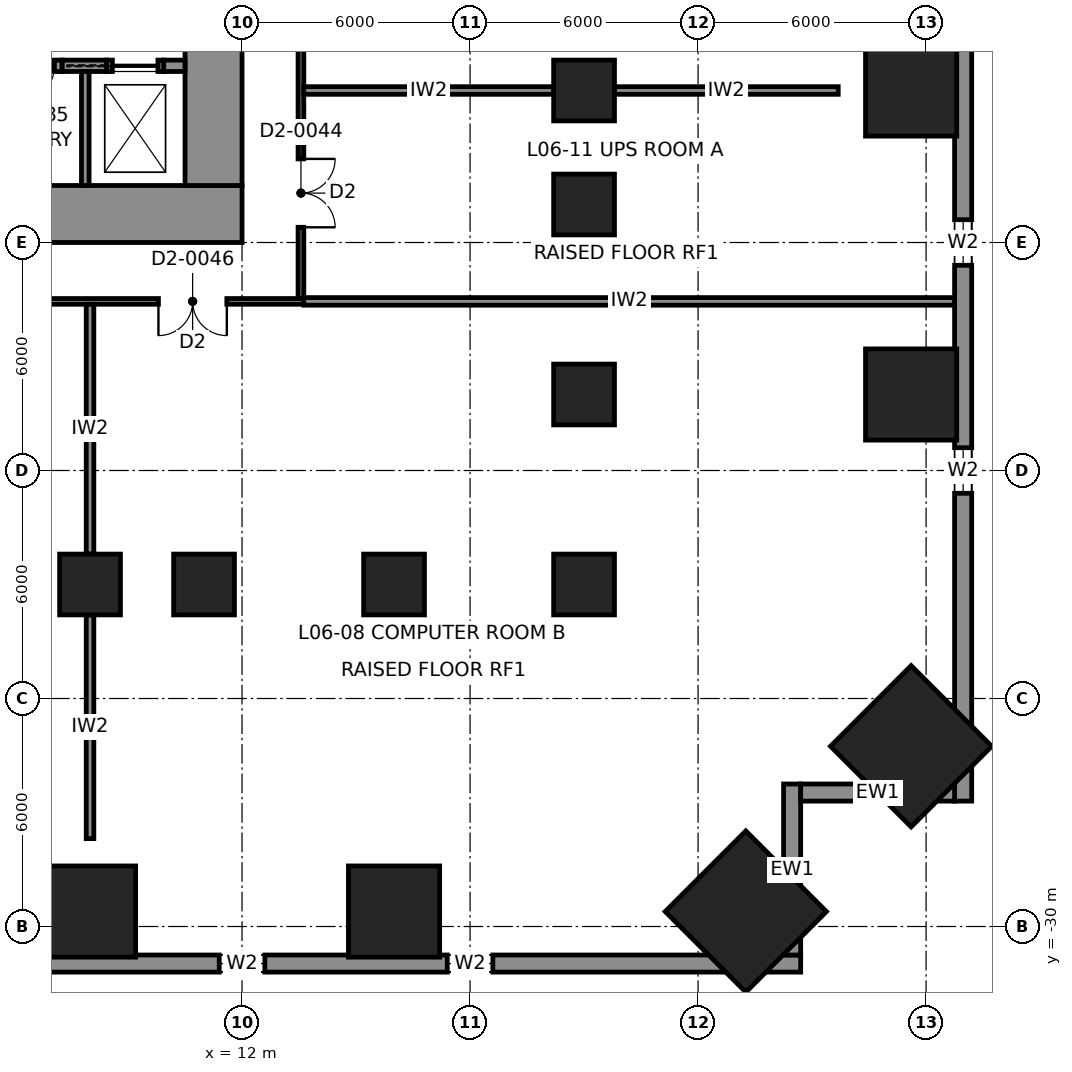
"""IFC4 building model, lengths in metres.
Left out: names, types, materials, properties, quantities, classifications, styles, units other than length and angle.
Written with IfcOpenShell. Run it as: python <this file> out.ifc"""

import sys

from ifc_helpers import new_model, si_unit, direction, frame, frame_2d, origin, origin_2d, place, context, subcontext, project, spatial, rectangle, extrude, element, fill, save


model = new_model("IFC4")
c1 = context("Model", 3, precision=1e-05, world=origin(), true_north=direction((0.0, 1.0)))
c2 = subcontext(c1, "Body", "Model", "MODEL_VIEW")
j1 = project(units=[si_unit("LENGTHUNIT", "METRE"), si_unit("PLANEANGLEUNIT", "RADIAN")], contexts=[c1])
p1 = place(None, origin())
s1 = spatial("IfcSite", under=j1, at=p1, CompositionType="ELEMENT")
p2 = place(p1, origin())
s2 = spatial("IfcBuilding", under=s1, at=p2, CompositionType="ELEMENT")
p3 = place(p2, frame((0.0, 0.0, 32.0)))
s3 = spatial("IfcBuildingStorey", under=s2, at=p3, CompositionType="ELEMENT", Elevation=32.0)
for number, where, z_axis, x_axis in (
    (1, (29.606, -25.256, 0.0), (-0.04, 0.04, 0.998), (-0.707, -0.707, 0.0)),
    (2, (25.256, -29.606, 0.0), (-0.04, 0.04, 0.998), (-0.707, -0.707, 0.0)),
):
    element("IfcColumn", number, at=place(p3, frame(where, z_axis=z_axis, x_axis=x_axis)), inside=s3, PredefinedType="COLUMN", context=c2, shape_type="SweptSolid", body=[
        extrude(rectangle(XDim=3.0, YDim=3.0, at=origin_2d()), origin(), (0.0, 0.0, 1.0), 5.509),
    ])
for number, where, z_axis, x_axis in (
    (3, (29.606, -8.0, 0.0), (-0.04, 0.0, 0.999), (0.0, -1.0, 0.0)),
    (4, (29.606, -16.0, 0.0), (-0.04, 0.0, 0.999), (0.0, -1.0, 0.0)),
    (5, (8.0, -29.606, 0.0), (0.0, 0.04, 0.999), (-1.0, 0.0, 0.0)),
    (6, (16.0, -29.606, 0.0), (0.0, 0.04, 0.999), (-1.0, 0.0, 0.0)),
):
    element("IfcColumn", number, at=place(p3, frame(where, z_axis=z_axis, x_axis=x_axis)), inside=s3, PredefinedType="COLUMN", context=c2, shape_type="SweptSolid", body=[
        extrude(rectangle(XDim=2.4, YDim=2.4, at=origin_2d()), origin(), (0.0, 0.0, 1.0), 5.504),
    ])
for number, where, z_axis, x_axis in (
    (7, (21.0, -8.0, 0.0), (0.0, 0.0, 1.0), (1.0, 0.0, 0.0)),
    (8, (21.0, -11.0, 0.0), (0.0, 0.0, 1.0), (1.0, 0.0, 0.0)),
    (9, (21.0, -16.0, 0.0), (0.0, 0.0, 1.0), (1.0, 0.0, 0.0)),
    (10, (8.0, -21.0, 0.0), (0.0, 0.0, 1.0), (1.0, 0.0, 0.0)),
    (11, (11.0, -21.0, 0.0), (0.0, 0.0, 1.0), (1.0, 0.0, 0.0)),
    (12, (16.0, -21.0, 0.0), (0.0, 0.0, 1.0), (1.0, 0.0, 0.0)),
    (13, (21.0, -21.0, 0.0), (0.0, 0.0, 1.0), (1.0, 0.0, 0.0)),
):
    element("IfcColumn", number, at=place(p3, frame(where, z_axis=z_axis, x_axis=x_axis)), inside=s3, PredefinedType="COLUMN", context=c2, shape_type="SweptSolid", body=[
        extrude(rectangle(XDim=1.6, YDim=1.6, at=origin_2d()), origin(), (0.0, 0.0, 1.0), 5.5),
    ])
p4 = place(p3, frame((12.0, -11.25, 0.0), z_axis=(0.0, 0.0, 1.0), x_axis=(-1.0, 0.0, 0.0)))
e14 = element("IfcWall", 14, at=p4, inside=s3, PredefinedType="SHEAR", context=c2, shape_type="SweptSolid", body=[
    extrude(rectangle(XDim=24.0, YDim=1.5, at=frame_2d((12.0, 0.0))), origin(), (0.0, 0.0, 1.0), 5.5),
])
p5 = place(p3, frame((11.25, 10.5, 0.0), z_axis=(0.0, 0.0, 1.0), x_axis=(0.0, -1.0, 0.0)))
e15 = element("IfcWall", 15, at=p5, inside=s3, PredefinedType="SHEAR", context=c2, shape_type="SweptSolid", body=[
    extrude(rectangle(XDim=21.0, YDim=1.5, at=frame_2d((10.5, 0.0))), origin(), (0.0, 0.0, 1.0), 5.5),
])
p6 = place(p5, frame((3.7, 0.0, 0.0)))
e16 = element("IfcOpeningElement", 16, at=p6, cuts=e15, PredefinedType="OPENING", context=c2, shape_type="SweptSolid", body=[
    extrude(rectangle(XDim=1.2, YDim=2.3, at=frame_2d((0.6, 1.15))), frame((0.0, 0.76, 0.0), z_axis=(0.0, -1.0, 0.0), x_axis=(1.0, 0.0, 0.0)), (0.0, 0.0, 1.0), 1.52),
])
p7 = place(p5, frame((16.1, 0.0, 0.0)))
e17 = element("IfcOpeningElement", 17, at=p7, cuts=e15, PredefinedType="OPENING", context=c2, shape_type="SweptSolid", body=[
    extrude(rectangle(XDim=1.2, YDim=2.3, at=frame_2d((0.6, 1.15))), frame((0.0, 0.76, 0.0), z_axis=(0.0, -1.0, 0.0), x_axis=(1.0, 0.0, 0.0)), (0.0, 0.0, 1.0), 1.52),
])
p8 = place(p3, frame((7.262, -7.35, 0.0), z_axis=(0.0, 0.0, 1.0), x_axis=(1.0, 0.0, 0.0)))
e18 = element("IfcWall", 18, at=p8, inside=s3, PredefinedType="SHEAR", context=c2, shape_type="SweptSolid", body=[
    extrude(rectangle(XDim=1.175, YDim=0.3, at=frame_2d((0.587, 0.0))), origin(), (0.0, 0.0, 1.0), 5.5),
])
p9 = place(p3, frame((9.938, -7.35, 0.0), z_axis=(0.0, 0.0, 1.0), x_axis=(1.0, 0.0, 0.0)))
e19 = element("IfcWall", 19, at=p9, inside=s3, PredefinedType="SHEAR", context=c2, shape_type="SweptSolid", body=[
    extrude(rectangle(XDim=0.562, YDim=0.3, at=frame_2d((0.281, 0.0))), origin(), (0.0, 0.0, 1.0), 5.5),
])
p10 = place(p3, frame((5.863, -7.35, 0.0), z_axis=(0.0, 0.0, 1.0), x_axis=(1.0, 0.0, 0.0)))
e20 = element("IfcWall", 20, at=p10, inside=s3, PredefinedType="PARTITIONING", context=c2, shape_type="SweptSolid", body=[
    extrude(rectangle(XDim=1.4, YDim=0.3, at=frame_2d((0.7, 0.0))), origin(), (0.0, 0.0, 1.0), 5.5),
])
p11 = place(p10, frame((0.2, 0.0, 0.0)))
e21 = element("IfcOpeningElement", 21, at=p11, cuts=e20, PredefinedType="OPENING", context=c2, shape_type="SweptSolid", body=[
    extrude(rectangle(XDim=1.0, YDim=2.3, at=frame_2d((0.5, 1.15))), frame((0.0, 0.16, 0.0), z_axis=(0.0, -1.0, 0.0), x_axis=(1.0, 0.0, 0.0)), (0.0, 0.0, 1.0), 0.32),
])
p12 = place(p3, frame((8.438, -7.35, 0.0), z_axis=(0.0, 0.0, 1.0), x_axis=(1.0, 0.0, 0.0)))
e22 = element("IfcWall", 22, at=p12, inside=s3, PredefinedType="PARTITIONING", context=c2, shape_type="SweptSolid", body=[
    extrude(rectangle(XDim=1.5, YDim=0.3, at=frame_2d((0.75, 0.0))), origin(), (0.0, 0.0, 1.0), 5.5),
])
p13 = place(p12, frame((0.15, 0.0, 0.0)))
e23 = element("IfcOpeningElement", 23, at=p13, cuts=e22, PredefinedType="OPENING", context=c2, shape_type="SweptSolid", body=[
    extrude(rectangle(XDim=1.2, YDim=2.3, at=frame_2d((0.6, 1.15))), frame((0.0, 0.16, 0.0), z_axis=(0.0, -1.0, 0.0), x_axis=(1.0, 0.0, 0.0)), (0.0, 0.0, 1.0), 0.32),
])
p14 = place(p3, frame((7.875, -10.5, 0.0), z_axis=(0.0, 0.0, 1.0), x_axis=(0.0, 1.0, 0.0)))
e24 = element("IfcWall", 24, at=p14, inside=s3, PredefinedType="PARTITIONING", context=c2, shape_type="SweptSolid", body=[
    extrude(rectangle(XDim=3.0, YDim=0.2, at=frame_2d((1.5, 0.0))), origin(), (0.0, 0.0, 1.0), 5.5),
])
p15 = place(p3, frame((30.975, -26.7, 0.0), z_axis=(0.0, 0.0, 1.0), x_axis=(0.0, 1.0, 0.0)))
e25 = element("IfcWall", 25, at=p15, inside=s3, PredefinedType="SOLIDWALL", context=c2, shape_type="SweptSolid", body=[
    extrude(rectangle(XDim=53.4, YDim=0.45, at=frame_2d((26.7, 0.0))), origin(), (0.0, 0.0, 1.0), 5.3),
])
p16 = place(p15, frame((8.1, 0.0, 0.9)))
e26 = element("IfcOpeningElement", 26, at=p16, cuts=e25, PredefinedType="OPENING", context=c2, shape_type="SweptSolid", body=[
    extrude(rectangle(XDim=1.2, YDim=2.0, at=frame_2d((0.6, 1.0))), frame((0.0, 0.235, 0.0), z_axis=(0.0, -1.0, 0.0), x_axis=(1.0, 0.0, 0.0)), (0.0, 0.0, 1.0), 0.47),
])
p17 = place(p15, frame((14.1, 0.0, 0.9)))
e27 = element("IfcOpeningElement", 27, at=p17, cuts=e25, PredefinedType="OPENING", context=c2, shape_type="SweptSolid", body=[
    extrude(rectangle(XDim=1.2, YDim=2.0, at=frame_2d((0.6, 1.0))), frame((0.0, 0.235, 0.0), z_axis=(0.0, -1.0, 0.0), x_axis=(1.0, 0.0, 0.0)), (0.0, 0.0, 1.0), 0.47),
])
p18 = place(p15, frame((20.1, 0.0, 0.9)))
e28 = element("IfcOpeningElement", 28, at=p18, cuts=e25, PredefinedType="OPENING", context=c2, shape_type="SweptSolid", body=[
    extrude(rectangle(XDim=1.2, YDim=2.0, at=frame_2d((0.6, 1.0))), frame((0.0, 0.235, 0.0), z_axis=(0.0, -1.0, 0.0), x_axis=(1.0, 0.0, 0.0)), (0.0, 0.0, 1.0), 0.47),
])
p19 = place(p15, frame((32.1, 0.0, 0.9)))
e29 = element("IfcOpeningElement", 29, at=p19, cuts=e25, PredefinedType="OPENING", context=c2, shape_type="SweptSolid", body=[
    extrude(rectangle(XDim=1.2, YDim=2.0, at=frame_2d((0.6, 1.0))), frame((0.0, 0.235, 0.0), z_axis=(0.0, -1.0, 0.0), x_axis=(1.0, 0.0, 0.0)), (0.0, 0.0, 1.0), 0.47),
])
p20 = place(p15, frame((38.1, 0.0, 0.9)))
e30 = element("IfcOpeningElement", 30, at=p20, cuts=e25, PredefinedType="OPENING", context=c2, shape_type="SweptSolid", body=[
    extrude(rectangle(XDim=1.2, YDim=2.0, at=frame_2d((0.6, 1.0))), frame((0.0, 0.235, 0.0), z_axis=(0.0, -1.0, 0.0), x_axis=(1.0, 0.0, 0.0)), (0.0, 0.0, 1.0), 0.47),
])
p21 = place(p15, frame((44.1, 0.0, 0.9)))
e31 = element("IfcOpeningElement", 31, at=p21, cuts=e25, PredefinedType="OPENING", context=c2, shape_type="SweptSolid", body=[
    extrude(rectangle(XDim=1.2, YDim=2.0, at=frame_2d((0.6, 1.0))), frame((0.0, 0.235, 0.0), z_axis=(0.0, -1.0, 0.0), x_axis=(1.0, 0.0, 0.0)), (0.0, 0.0, 1.0), 0.47),
])
p22 = place(p3, frame((-26.7, -30.975, 0.0), z_axis=(0.0, 0.0, 1.0), x_axis=(1.0, 0.0, 0.0)))
e32 = element("IfcWall", 32, at=p22, inside=s3, PredefinedType="SOLIDWALL", context=c2, shape_type="SweptSolid", body=[
    extrude(rectangle(XDim=53.4, YDim=0.45, at=frame_2d((26.7, 0.0))), origin(), (0.0, 0.0, 1.0), 5.3),
])
p23 = place(p22, frame((8.1, 0.0, 0.9)))
e33 = element("IfcOpeningElement", 33, at=p23, cuts=e32, PredefinedType="OPENING", context=c2, shape_type="SweptSolid", body=[
    extrude(rectangle(XDim=1.2, YDim=2.0, at=frame_2d((0.6, 1.0))), frame((0.0, 0.235, 0.0), z_axis=(0.0, -1.0, 0.0), x_axis=(1.0, 0.0, 0.0)), (0.0, 0.0, 1.0), 0.47),
])
p24 = place(p22, frame((14.1, 0.0, 0.9)))
e34 = element("IfcOpeningElement", 34, at=p24, cuts=e32, PredefinedType="OPENING", context=c2, shape_type="SweptSolid", body=[
    extrude(rectangle(XDim=1.2, YDim=2.0, at=frame_2d((0.6, 1.0))), frame((0.0, 0.235, 0.0), z_axis=(0.0, -1.0, 0.0), x_axis=(1.0, 0.0, 0.0)), (0.0, 0.0, 1.0), 0.47),
])
p25 = place(p22, frame((20.1, 0.0, 0.9)))
e35 = element("IfcOpeningElement", 35, at=p25, cuts=e32, PredefinedType="OPENING", context=c2, shape_type="SweptSolid", body=[
    extrude(rectangle(XDim=1.2, YDim=2.0, at=frame_2d((0.6, 1.0))), frame((0.0, 0.235, 0.0), z_axis=(0.0, -1.0, 0.0), x_axis=(1.0, 0.0, 0.0)), (0.0, 0.0, 1.0), 0.47),
])
p26 = place(p22, frame((32.1, 0.0, 0.9)))
e36 = element("IfcOpeningElement", 36, at=p26, cuts=e32, PredefinedType="OPENING", context=c2, shape_type="SweptSolid", body=[
    extrude(rectangle(XDim=1.2, YDim=2.0, at=frame_2d((0.6, 1.0))), frame((0.0, 0.235, 0.0), z_axis=(0.0, -1.0, 0.0), x_axis=(1.0, 0.0, 0.0)), (0.0, 0.0, 1.0), 0.47),
])
p27 = place(p22, frame((38.1, 0.0, 0.9)))
e37 = element("IfcOpeningElement", 37, at=p27, cuts=e32, PredefinedType="OPENING", context=c2, shape_type="SweptSolid", body=[
    extrude(rectangle(XDim=1.2, YDim=2.0, at=frame_2d((0.6, 1.0))), frame((0.0, 0.235, 0.0), z_axis=(0.0, -1.0, 0.0), x_axis=(1.0, 0.0, 0.0)), (0.0, 0.0, 1.0), 0.47),
])
p28 = place(p22, frame((44.1, 0.0, 0.9)))
e38 = element("IfcOpeningElement", 38, at=p28, cuts=e32, PredefinedType="OPENING", context=c2, shape_type="SweptSolid", body=[
    extrude(rectangle(XDim=1.2, YDim=2.0, at=frame_2d((0.6, 1.0))), frame((0.0, 0.235, 0.0), z_axis=(0.0, -1.0, 0.0), x_axis=(1.0, 0.0, 0.0)), (0.0, 0.0, 1.0), 0.47),
])
p29 = place(p3, frame((26.475, -26.25, 0.0), z_axis=(0.0, 0.0, 1.0), x_axis=(0.0, -1.0, 0.0)))
e39 = element("IfcWall", 39, at=p29, inside=s3, PredefinedType="SOLIDWALL", context=c2, shape_type="SweptSolid", body=[
    extrude(rectangle(XDim=4.5, YDim=0.45, at=frame_2d((2.25, 0.0))), origin(), (0.0, 0.0, 1.0), 5.3),
])
p30 = place(p3, frame((26.7, -26.475, 0.0), z_axis=(0.0, 0.0, 1.0), x_axis=(1.0, 0.0, 0.0)))
e40 = element("IfcWall", 40, at=p30, inside=s3, PredefinedType="SOLIDWALL", context=c2, shape_type="SweptSolid", body=[
    extrude(rectangle(XDim=4.05, YDim=0.45, at=frame_2d((2.025, 0.0))), origin(), (0.0, 0.0, 1.0), 5.3),
])
p31 = place(p3, frame((13.625, -13.55, 0.0), z_axis=(0.0, 0.0, 1.0), x_axis=(-1.0, 0.0, 0.0)))
e41 = element("IfcWall", 41, at=p31, inside=s3, PredefinedType="PARTITIONING", context=c2, shape_type="SweptSolid", body=[
    extrude(rectangle(XDim=27.25, YDim=0.15, at=frame_2d((13.625, 0.0))), origin(), (0.0, 0.0, 1.0), 5.3),
])
p32 = place(p31, frame((23.425, 0.0, 0.0)))
e42 = element("IfcOpeningElement", 42, at=p32, cuts=e41, PredefinedType="OPENING", context=c2, shape_type="SweptSolid", body=[
    extrude(rectangle(XDim=1.8, YDim=2.3, at=frame_2d((0.9, 1.15))), frame((0.0, 0.085, 0.0), z_axis=(0.0, -1.0, 0.0), x_axis=(1.0, 0.0, 0.0)), (0.0, 0.0, 1.0), 0.17),
])
p33 = place(p31, frame((19.575, 0.0, 0.0)))
e43 = element("IfcOpeningElement", 43, at=p33, cuts=e41, PredefinedType="OPENING", context=c2, shape_type="SweptSolid", body=[
    extrude(rectangle(XDim=1.0, YDim=2.3, at=frame_2d((0.5, 1.15))), frame((0.0, 0.085, 0.0), z_axis=(0.0, -1.0, 0.0), x_axis=(1.0, 0.0, 0.0)), (0.0, 0.0, 1.0), 0.17),
])
p34 = place(p31, frame((2.025, 0.0, 0.0)))
e44 = element("IfcOpeningElement", 44, at=p34, cuts=e41, PredefinedType="OPENING", context=c2, shape_type="SweptSolid", body=[
    extrude(rectangle(XDim=1.8, YDim=2.3, at=frame_2d((0.9, 1.15))), frame((0.0, 0.085, 0.0), z_axis=(0.0, -1.0, 0.0), x_axis=(1.0, 0.0, 0.0)), (0.0, 0.0, 1.0), 0.17),
])
p35 = place(p31, frame((16.125, 0.0, 0.0)))
e45 = element("IfcOpeningElement", 45, at=p35, cuts=e41, PredefinedType="OPENING", context=c2, shape_type="SweptSolid", body=[
    extrude(rectangle(XDim=1.0, YDim=2.3, at=frame_2d((0.5, 1.15))), frame((0.0, 0.085, 0.0), z_axis=(0.0, -1.0, 0.0), x_axis=(1.0, 0.0, 0.0)), (0.0, 0.0, 1.0), 0.17),
])
p36 = place(p31, frame((9.625, 0.0, 0.0)))
e46 = element("IfcOpeningElement", 46, at=p36, cuts=e41, PredefinedType="OPENING", context=c2, shape_type="SweptSolid", body=[
    extrude(rectangle(XDim=1.0, YDim=2.3, at=frame_2d((0.5, 1.15))), frame((0.0, 0.085, 0.0), z_axis=(0.0, -1.0, 0.0), x_axis=(1.0, 0.0, 0.0)), (0.0, 0.0, 1.0), 0.17),
])
p37 = place(p3, frame((13.55, -13.475, 0.0), z_axis=(0.0, 0.0, 1.0), x_axis=(0.0, 1.0, 0.0)))
e47 = element("IfcWall", 47, at=p37, inside=s3, PredefinedType="PARTITIONING", context=c2, shape_type="SweptSolid", body=[
    extrude(rectangle(XDim=26.95, YDim=0.15, at=frame_2d((13.475, 0.0))), origin(), (0.0, 0.0, 1.0), 5.3),
])
p38 = place(p37, frame((1.875, 0.0, 0.0)))
e48 = element("IfcOpeningElement", 48, at=p38, cuts=e47, PredefinedType="OPENING", context=c2, shape_type="SweptSolid", body=[
    extrude(rectangle(XDim=1.8, YDim=2.3, at=frame_2d((0.9, 1.15))), frame((0.0, 0.085, 0.0), z_axis=(0.0, -1.0, 0.0), x_axis=(1.0, 0.0, 0.0)), (0.0, 0.0, 1.0), 0.17),
])
p39 = place(p37, frame((12.575, 0.0, 0.0)))
e49 = element("IfcOpeningElement", 49, at=p39, cuts=e47, PredefinedType="OPENING", context=c2, shape_type="SweptSolid", body=[
    extrude(rectangle(XDim=1.8, YDim=2.3, at=frame_2d((0.9, 1.15))), frame((0.0, 0.085, 0.0), z_axis=(0.0, -1.0, 0.0), x_axis=(1.0, 0.0, 0.0)), (0.0, 0.0, 1.0), 0.17),
])
p40 = place(p37, frame((23.275, 0.0, 0.0)))
e50 = element("IfcOpeningElement", 50, at=p40, cuts=e47, PredefinedType="OPENING", context=c2, shape_type="SweptSolid", body=[
    extrude(rectangle(XDim=1.8, YDim=2.3, at=frame_2d((0.9, 1.15))), frame((0.0, 0.085, 0.0), z_axis=(0.0, -1.0, 0.0), x_axis=(1.0, 0.0, 0.0)), (0.0, 0.0, 1.0), 0.17),
])
p41 = place(p3, frame((30.75, -13.55, 0.0), z_axis=(0.0, 0.0, 1.0), x_axis=(-1.0, 0.0, 0.0)))
e51 = element("IfcWall", 51, at=p41, inside=s3, PredefinedType="PARTITIONING", context=c2, shape_type="SweptSolid", body=[
    extrude(rectangle(XDim=17.125, YDim=0.2, at=frame_2d((8.562, 0.0))), origin(), (0.0, 0.0, 1.0), 5.3),
])
p42 = place(p3, frame((8.0, -13.625, 0.0), z_axis=(0.0, 0.0, 1.0), x_axis=(0.0, -1.0, 0.0)))
e52 = element("IfcWall", 52, at=p42, inside=s3, PredefinedType="PARTITIONING", context=c2, shape_type="SweptSolid", body=[
    extrude(rectangle(XDim=6.575, YDim=0.2, at=frame_2d((3.288, 0.0))), origin(), (0.0, 0.0, 1.0), 4.731),
])
p43 = place(p3, frame((8.0, -21.8, 0.0), z_axis=(0.0, 0.0, 1.0), x_axis=(0.0, -1.0, 0.0)))
e53 = element("IfcWall", 53, at=p43, inside=s3, PredefinedType="PARTITIONING", context=c2, shape_type="SweptSolid", body=[
    extrude(rectangle(XDim=5.887, YDim=0.2, at=frame_2d((2.944, 0.0))), origin(), (0.0, 0.0, 1.0), 4.731),
])
p44 = place(p3, frame((13.625, -8.0, 0.0), z_axis=(0.0, 0.0, 1.0), x_axis=(1.0, 0.0, 0.0)))
e54 = element("IfcWall", 54, at=p44, inside=s3, PredefinedType="PARTITIONING", context=c2, shape_type="SweptSolid", body=[
    extrude(rectangle(XDim=6.575, YDim=0.2, at=frame_2d((3.288, 0.0))), origin(), (0.0, 0.0, 1.0), 4.731),
])
p45 = place(p3, frame((21.8, -8.0, 0.0), z_axis=(0.0, 0.0, 1.0), x_axis=(1.0, 0.0, 0.0)))
e55 = element("IfcWall", 55, at=p45, inside=s3, PredefinedType="PARTITIONING", context=c2, shape_type="SweptSolid", body=[
    extrude(rectangle(XDim=5.887, YDim=0.2, at=frame_2d((2.944, 0.0))), origin(), (0.0, 0.0, 1.0), 4.731),
])
p46 = place(p16, origin())
e56 = element("IfcWindow", 56, at=p46, inside=s3, PartitioningType="SINGLE_PANEL", PredefinedType="WINDOW", context=c2, shape_type="SweptSolid", body=[
    extrude(rectangle(XDim=1.2, YDim=2.0, at=frame_2d((0.6, 1.0))), frame((0.0, 0.03, 0.0), z_axis=(0.0, -1.0, 0.0), x_axis=(1.0, 0.0, 0.0)), (0.0, 0.0, 1.0), 0.06),
])
fill(e26, e56)
p47 = place(p17, origin())
e57 = element("IfcWindow", 57, at=p47, inside=s3, PartitioningType="SINGLE_PANEL", PredefinedType="WINDOW", context=c2, shape_type="SweptSolid", body=[
    extrude(rectangle(XDim=1.2, YDim=2.0, at=frame_2d((0.6, 1.0))), frame((0.0, 0.03, 0.0), z_axis=(0.0, -1.0, 0.0), x_axis=(1.0, 0.0, 0.0)), (0.0, 0.0, 1.0), 0.06),
])
fill(e27, e57)
p48 = place(p27, origin())
e58 = element("IfcWindow", 58, at=p48, inside=s3, PartitioningType="SINGLE_PANEL", PredefinedType="WINDOW", context=c2, shape_type="SweptSolid", body=[
    extrude(rectangle(XDim=1.2, YDim=2.0, at=frame_2d((0.6, 1.0))), frame((0.0, 0.03, 0.0), z_axis=(0.0, -1.0, 0.0), x_axis=(1.0, 0.0, 0.0)), (0.0, 0.0, 1.0), 0.06),
])
fill(e37, e58)
p49 = place(p28, origin())
e59 = element("IfcWindow", 59, at=p49, inside=s3, PartitioningType="SINGLE_PANEL", PredefinedType="WINDOW", context=c2, shape_type="SweptSolid", body=[
    extrude(rectangle(XDim=1.2, YDim=2.0, at=frame_2d((0.6, 1.0))), frame((0.0, 0.03, 0.0), z_axis=(0.0, -1.0, 0.0), x_axis=(1.0, 0.0, 0.0)), (0.0, 0.0, 1.0), 0.06),
])
fill(e38, e59)
p50 = place(p34, origin())
e60 = element("IfcDoor", 60, at=p50, inside=s3, OperationType="DOUBLE_DOOR_DOUBLE_SWING", PredefinedType="DOOR", context=c2, shape_type="SweptSolid", body=[
    extrude(rectangle(XDim=1.8, YDim=2.3, at=frame_2d((0.9, 1.15))), frame((0.0, 0.025, 0.0), z_axis=(0.0, -1.0, 0.0), x_axis=(1.0, 0.0, 0.0)), (0.0, 0.0, 1.0), 0.05),
])
fill(e44, e60)
p51 = place(p38, frame((1.8, 0.0, 0.0), z_axis=(0.0, 0.0, 1.0), x_axis=(-1.0, 0.0, 0.0)))
e61 = element("IfcDoor", 61, at=p51, inside=s3, OperationType="DOUBLE_DOOR_DOUBLE_SWING", PredefinedType="DOOR", context=c2, shape_type="SweptSolid", body=[
    extrude(rectangle(XDim=1.8, YDim=2.3, at=frame_2d((0.9, 1.15))), frame((0.0, 0.025, 0.0), z_axis=(0.0, -1.0, 0.0), x_axis=(1.0, 0.0, 0.0)), (0.0, 0.0, 1.0), 0.05),
])
fill(e48, e61)
p52 = place(p11, frame((1.0, 0.0, 0.0), z_axis=(0.0, 0.0, 1.0), x_axis=(-1.0, 0.0, 0.0)))
e62 = element("IfcDoor", 62, at=p52, inside=s3, OperationType="SINGLE_SWING_RIGHT", PredefinedType="DOOR", context=c2, shape_type="SweptSolid", body=[
    extrude(rectangle(XDim=1.0, YDim=2.3, at=frame_2d((0.5, 1.15))), frame((0.0, 0.025, 0.0), z_axis=(0.0, -1.0, 0.0), x_axis=(1.0, 0.0, 0.0)), (0.0, 0.0, 1.0), 0.05),
])
fill(e21, e62)
p53 = place(p13, origin())
e63 = element("IfcDoor", 63, at=p53, inside=s3, OperationType="SLIDING_TO_LEFT", PredefinedType="DOOR", context=c2, shape_type="SweptSolid", body=[
    extrude(rectangle(XDim=1.2, YDim=2.3, at=frame_2d((0.6, 1.15))), frame((0.0, 0.025, 0.0), z_axis=(0.0, -1.0, 0.0), x_axis=(1.0, 0.0, 0.0)), (0.0, 0.0, 1.0), 0.05),
])
fill(e23, e63)
save(model, sys.argv[1])
